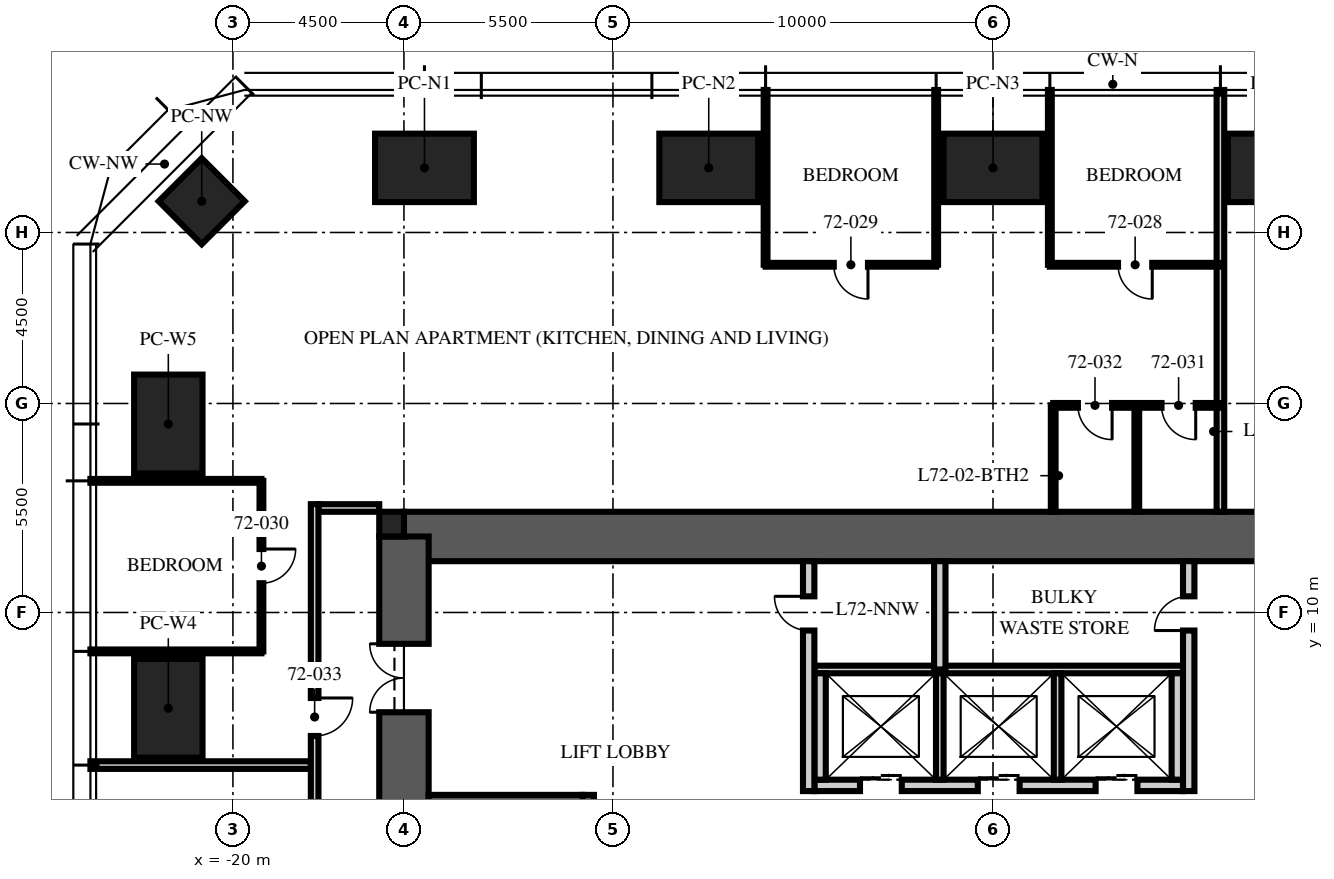
"""IFC4 building model, lengths in metres.
Left out: names, types, materials, properties, quantities, classifications, styles, units other than length and angle.
Written with IfcOpenShell. Run it as: python <this file> out.ifc"""

import sys

from ifc_helpers import new_model, si_unit, direction, frame, frame_2d, origin, origin_2d, place, context, subcontext, project, spatial, rectangle, extrude, element, fill, save


model = new_model("IFC4")
c1 = context("Model", 3, precision=1e-05, world=origin(), true_north=direction((0.0, 1.0)))
c2 = subcontext(c1, "Body", "Model", "MODEL_VIEW")
j1 = project(units=[si_unit("LENGTHUNIT", "METRE"), si_unit("PLANEANGLEUNIT", "RADIAN")], contexts=[c1])
p1 = place(None, origin())
s1 = spatial("IfcSite", under=j1, at=p1, CompositionType="ELEMENT")
p2 = place(p1, origin())
s2 = spatial("IfcBuilding", under=s1, at=p2, CompositionType="ELEMENT")
p3 = place(p2, frame((0.0, 0.0, 289.5)))
s3 = spatial("IfcBuildingStorey", under=s2, at=p3, CompositionType="ELEMENT", Elevation=289.5)
p4 = place(p3, frame((-15.5, 12.0, -0.25), z_axis=(0.0, 0.0, 1.0), x_axis=(1.0, 0.0, 0.0)))
e1 = element("IfcWall", 1, at=p4, inside=s3, PredefinedType="SHEAR", context=c2, shape_type="SweptSolid", body=[
    extrude(rectangle(XDim=31.0, YDim=1.3, at=frame_2d((15.5, 0.0))), origin(), (0.0, 0.0, 1.0), 3.75),
])
p5 = place(p3, frame((-15.5, -12.0, -0.25), z_axis=(0.0, 0.0, 1.0), x_axis=(0.0, 1.0, 0.0)))
e2 = element("IfcWall", 2, at=p5, inside=s3, PredefinedType="SHEAR", context=c2, shape_type="SweptSolid", body=[
    extrude(rectangle(XDim=24.0, YDim=1.3, at=frame_2d((12.0, 0.0))), origin(), (0.0, 0.0, 1.0), 3.75),
])
p6 = place(p5, frame((3.125, 0.0, 0.25)))
e3 = element("IfcOpeningElement", 3, at=p6, cuts=e2, PredefinedType="OPENING", context=c2, shape_type="SweptSolid", body=[
    extrude(rectangle(XDim=1.2, YDim=2.1, at=frame_2d((0.6, 1.05))), frame((0.0, 0.66, 0.0), z_axis=(0.0, -1.0, 0.0), x_axis=(1.0, 0.0, 0.0)), (0.0, 0.0, 1.0), 1.32),
])
p7 = place(p5, frame((19.375, 0.0, 0.25)))
e4 = element("IfcOpeningElement", 4, at=p7, cuts=e2, PredefinedType="OPENING", context=c2, shape_type="SweptSolid", body=[
    extrude(rectangle(XDim=1.8, YDim=2.1, at=frame_2d((0.9, 1.05))), frame((0.0, 0.66, 0.0), z_axis=(0.0, -1.0, 0.0), x_axis=(1.0, 0.0, 0.0)), (0.0, 0.0, 1.0), 1.32),
])
p8 = place(p3, frame((-15.825, 12.325, -0.25), z_axis=(0.0, 0.0, 1.0), x_axis=(1.0, 0.0, 0.0)))
e5 = element("IfcColumn", 5, at=p8, inside=s3, PredefinedType="COLUMN", context=c2, shape_type="SweptSolid", body=[
    extrude(rectangle(XDim=0.65, YDim=0.65, at=origin_2d()), origin(), (0.0, 0.0, 1.0), 3.75),
])
for number, where, z_axis, x_axis in (
    (6, (-14.96, 21.7, 0.0), (0.0, 0.0, 1.0), (1.0, 0.0, 0.0)),
    (7, (-7.48, 21.7, 0.0), (0.0, 0.0, 1.0), (1.0, 0.0, 0.0)),
    (8, (0.0, 21.7, 0.0), (0.0, 0.0, 1.0), (1.0, 0.0, 0.0)),
    (9, (7.48, 21.7, 0.0), (0.0, 0.0, 1.0), (1.0, 0.0, 0.0)),
    (10, (-21.7, 7.48, 0.0), (0.0, 0.0, 1.0), (0.0, 1.0, 0.0)),
    (11, (-21.7, 14.96, 0.0), (0.0, 0.0, 1.0), (0.0, 1.0, 0.0)),
):
    element("IfcColumn", number, at=place(p3, frame(where, z_axis=z_axis, x_axis=x_axis)), inside=s3, PredefinedType="COLUMN", context=c2, shape_type="SweptSolid", body=[
        extrude(rectangle(XDim=2.6, YDim=1.8, at=origin_2d()), origin(), (0.0, 0.0, 1.0), 3.75),
    ])
p9 = place(p3, frame((-20.821, 20.821, 0.0), z_axis=(0.0, 0.0, 1.0), x_axis=(0.707106781187, 0.707106781187, 0.0)))
e12 = element("IfcColumn", 12, at=p9, inside=s3, PredefinedType="COLUMN", context=c2, shape_type="SweptSolid", body=[
    extrude(rectangle(XDim=1.6, YDim=1.6, at=origin_2d()), origin(), (0.0, 0.0, 1.0), 3.75),
])
p10 = place(p3, frame((-10.65, -4.9, 0.0), z_axis=(0.0, 0.0, 1.0), x_axis=(0.0, 1.0, 0.0)))
e13 = element("IfcWall", 13, at=p10, inside=s3, PredefinedType="SOLIDWALL", context=c2, shape_type="SweptSolid", body=[
    extrude(rectangle(XDim=10.1, YDim=0.3, at=frame_2d((5.05, 0.0))), origin(), (0.0, 0.0, 1.0), 3.5),
])
p11 = place(p3, frame((-14.85, 5.05, 0.0), z_axis=(0.0, 0.0, 1.0), x_axis=(1.0, 0.0, 0.0)))
e14 = element("IfcWall", 14, at=p11, inside=s3, PredefinedType="SOLIDWALL", context=c2, shape_type="SweptSolid", body=[
    extrude(rectangle(XDim=4.05, YDim=0.3, at=frame_2d((2.025, 0.0))), origin(), (0.0, 0.0, 1.0), 3.5),
])
p12 = place(p3, frame((-4.7, 5.45, 0.0), z_axis=(0.0, 0.0, 1.0), x_axis=(1.0, 0.0, 0.0)))
e15 = element("IfcWall", 15, at=p12, inside=s3, PredefinedType="PARTITIONING", context=c2, shape_type="SweptSolid", body=[
    extrude(rectangle(XDim=9.7, YDim=0.3, at=frame_2d((4.85, 0.0))), origin(), (0.0, 0.0, 1.0), 3.5),
])
p13 = place(p12, frame((1.2, 0.0, 0.0)))
e16 = element("IfcOpeningElement", 16, at=p13, cuts=e15, PredefinedType="OPENING", context=c2, shape_type="SweptSolid", body=[
    extrude(rectangle(XDim=1.1, YDim=2.1, at=frame_2d((0.55, 1.05))), frame((0.0, 0.16, 0.0), z_axis=(0.0, -1.0, 0.0), x_axis=(1.0, 0.0, 0.0)), (0.0, 0.0, 1.0), 0.32),
])
p14 = place(p12, frame((4.3, 0.0, 0.0)))
e17 = element("IfcOpeningElement", 17, at=p14, cuts=e15, PredefinedType="OPENING", context=c2, shape_type="SweptSolid", body=[
    extrude(rectangle(XDim=1.1, YDim=2.1, at=frame_2d((0.55, 1.05))), frame((0.0, 0.16, 0.0), z_axis=(0.0, -1.0, 0.0), x_axis=(1.0, 0.0, 0.0)), (0.0, 0.0, 1.0), 0.32),
])
p15 = place(p12, frame((7.4, 0.0, 0.0)))
e18 = element("IfcOpeningElement", 18, at=p15, cuts=e15, PredefinedType="OPENING", context=c2, shape_type="SweptSolid", body=[
    extrude(rectangle(XDim=1.1, YDim=2.1, at=frame_2d((0.55, 1.05))), frame((0.0, 0.16, 0.0), z_axis=(0.0, -1.0, 0.0), x_axis=(1.0, 0.0, 0.0)), (0.0, 0.0, 1.0), 0.32),
])
p16 = place(p3, frame((-4.7, 8.5, 0.0), z_axis=(0.0, 0.0, 1.0), x_axis=(1.0, 0.0, 0.0)))
e19 = element("IfcWall", 19, at=p16, inside=s3, PredefinedType="PARTITIONING", context=c2, shape_type="SweptSolid", body=[
    extrude(rectangle(XDim=9.7, YDim=0.2, at=frame_2d((4.85, 0.0))), origin(), (0.0, 0.0, 1.0), 3.5),
])
for number, where, z_axis, x_axis in (
    (20, (-4.55, 5.6, 0.0), (0.0, 0.0, 1.0), (0.0, 1.0, 0.0)),
    (21, (4.85, 5.6, 0.0), (0.0, 0.0, 1.0), (0.0, 1.0, 0.0)),
):
    element("IfcWall", number, at=place(p3, frame(where, z_axis=z_axis, x_axis=x_axis)), inside=s3, PredefinedType="PARTITIONING", context=c2, shape_type="SweptSolid", body=[
        extrude(rectangle(XDim=2.8, YDim=0.3, at=frame_2d((1.4, 0.0))), origin(), (0.0, 0.0, 1.0), 3.5),
    ])
for number, where, z_axis, x_axis in (
    (22, (-1.4, 5.6, 0.0), (0.0, 0.0, 1.0), (0.0, 1.0, 0.0)),
    (23, (1.7, 5.6, 0.0), (0.0, 0.0, 1.0), (0.0, 1.0, 0.0)),
):
    element("IfcWall", number, at=place(p3, frame(where, z_axis=z_axis, x_axis=x_axis)), inside=s3, PredefinedType="PARTITIONING", context=c2, shape_type="SweptSolid", body=[
        extrude(rectangle(XDim=2.8, YDim=0.2, at=frame_2d((1.4, 0.0))), origin(), (0.0, 0.0, 1.0), 3.5),
    ])
p17 = place(p3, frame((-4.85, 5.3, 0.0), z_axis=(0.0, 0.0, 1.0), x_axis=(0.0, 1.0, 0.0)))
e24 = element("IfcWall", 24, at=p17, inside=s3, PredefinedType="PARTITIONING", context=c2, shape_type="SweptSolid", body=[
    extrude(rectangle(XDim=6.05, YDim=0.3, at=frame_2d((3.025, 0.0))), origin(), (0.0, 0.0, 1.0), 3.5),
])
p18 = place(p17, frame((4.225, 0.0, 0.0)))
e25 = element("IfcOpeningElement", 25, at=p18, cuts=e24, PredefinedType="OPENING", context=c2, shape_type="SweptSolid", body=[
    extrude(rectangle(XDim=0.9, YDim=2.1, at=frame_2d((0.45, 1.05))), frame((0.0, 0.16, 0.0), z_axis=(0.0, -1.0, 0.0), x_axis=(1.0, 0.0, 0.0)), (0.0, 0.0, 1.0), 0.32),
])
p19 = place(p3, frame((5.15, 5.3, 0.0), z_axis=(0.0, 0.0, 1.0), x_axis=(0.0, 1.0, 0.0)))
e26 = element("IfcWall", 26, at=p19, inside=s3, PredefinedType="PARTITIONING", context=c2, shape_type="SweptSolid", body=[
    extrude(rectangle(XDim=6.05, YDim=0.3, at=frame_2d((3.025, 0.0))), origin(), (0.0, 0.0, 1.0), 3.5),
])
p20 = place(p19, frame((4.225, 0.0, 0.0)))
e27 = element("IfcOpeningElement", 27, at=p20, cuts=e26, PredefinedType="OPENING", context=c2, shape_type="SweptSolid", body=[
    extrude(rectangle(XDim=0.9, YDim=2.1, at=frame_2d((0.45, 1.05))), frame((0.0, 0.16, 0.0), z_axis=(0.0, -1.0, 0.0), x_axis=(1.0, 0.0, 0.0)), (0.0, 0.0, 1.0), 0.32),
])
p21 = place(p3, frame((-1.4, 8.5, 0.0), z_axis=(0.0, 0.0, 1.0), x_axis=(0.0, 1.0, 0.0)))
e28 = element("IfcWall", 28, at=p21, inside=s3, PredefinedType="PARTITIONING", context=c2, shape_type="SweptSolid", body=[
    extrude(rectangle(XDim=2.85, YDim=0.3, at=frame_2d((1.425, 0.0))), origin(), (0.0, 0.0, 1.0), 3.5),
])
p22 = place(p3, frame((-16.15, 12.75, 0.0), z_axis=(0.0, 0.0, 1.0), x_axis=(-1.0, 0.0, 0.0)))
e29 = element("IfcWall", 29, at=p22, inside=s3, PredefinedType="PARTITIONING", context=c2, shape_type="SweptSolid", body=[
    extrude(rectangle(XDim=1.6, YDim=0.2, at=frame_2d((0.8, 0.0))), origin(), (0.0, 0.0, 1.0), 2.6),
])
p23 = place(p3, frame((5.984, 12.65, 0.0), z_axis=(0.0, 0.0, 1.0), x_axis=(0.0, 1.0, 0.0)))
e30 = element("IfcWall", 30, at=p23, inside=s3, PredefinedType="PARTITIONING", context=c2, shape_type="SweptSolid", body=[
    extrude(rectangle(XDim=11.1, YDim=0.2, at=frame_2d((5.55, 0.0))), origin(), (0.0, 0.0, 1.0), 3.01),
])
for number, where, z_axis, x_axis in (
    (31, (1.496, 19.15, 0.0), (0.0, 0.0, 1.0), (0.0, 1.0, 0.0)),
    (32, (-1.496, 19.15, 0.0), (0.0, 0.0, 1.0), (0.0, 1.0, 0.0)),
    (33, (-5.984, 19.15, 0.0), (0.0, 0.0, 1.0), (0.0, 1.0, 0.0)),
):
    element("IfcWall", number, at=place(p3, frame(where, z_axis=z_axis, x_axis=x_axis)), inside=s3, PredefinedType="PARTITIONING", context=c2, shape_type="SweptSolid", body=[
        extrude(rectangle(XDim=4.6, YDim=0.1, at=frame_2d((2.3, 0.0))), origin(), (0.0, 0.0, 1.0), 3.01),
    ])
for number, where, z_axis, x_axis in (
    (34, (-19.25, 13.464, 0.0), (0.0, 0.0, 1.0), (-1.0, 0.0, 0.0)),
    (35, (-19.25, 8.976, 0.0), (0.0, 0.0, 1.0), (-1.0, 0.0, 0.0)),
):
    element("IfcWall", number, at=place(p3, frame(where, z_axis=z_axis, x_axis=x_axis)), inside=s3, PredefinedType="PARTITIONING", context=c2, shape_type="SweptSolid", body=[
        extrude(rectangle(XDim=4.5, YDim=0.1, at=frame_2d((2.25, 0.0))), origin(), (0.0, 0.0, 1.0), 3.01),
    ])
p24 = place(p3, frame((-17.95, 5.984, 0.0), z_axis=(0.0, 0.0, 1.0), x_axis=(-1.0, 0.0, 0.0)))
e36 = element("IfcWall", 36, at=p24, inside=s3, PredefinedType="PARTITIONING", context=c2, shape_type="SweptSolid", body=[
    extrude(rectangle(XDim=5.8, YDim=0.2, at=frame_2d((2.9, 0.0))), origin(), (0.0, 0.0, 1.0), 3.01),
])
p25 = place(p3, frame((5.984, 19.15, 0.0), z_axis=(0.0, 0.0, 1.0), x_axis=(-1.0, 0.0, 0.0)))
e37 = element("IfcWall", 37, at=p25, inside=s3, PredefinedType="PARTITIONING", context=c2, shape_type="SweptSolid", body=[
    extrude(rectangle(XDim=4.488, YDim=0.1, at=frame_2d((2.244, 0.0))), origin(), (0.0, 0.0, 1.0), 2.91),
])
p26 = place(p25, frame((1.794, 0.0, 0.0)))
e38 = element("IfcOpeningElement", 38, at=p26, cuts=e37, PredefinedType="OPENING", context=c2, shape_type="SweptSolid", body=[
    extrude(rectangle(XDim=0.9, YDim=2.1, at=frame_2d((0.45, 1.05))), frame((0.0, 0.06, 0.0), z_axis=(0.0, -1.0, 0.0), x_axis=(1.0, 0.0, 0.0)), (0.0, 0.0, 1.0), 0.12),
])
p27 = place(p3, frame((-1.496, 19.15, 0.0), z_axis=(0.0, 0.0, 1.0), x_axis=(-1.0, 0.0, 0.0)))
e39 = element("IfcWall", 39, at=p27, inside=s3, PredefinedType="PARTITIONING", context=c2, shape_type="SweptSolid", body=[
    extrude(rectangle(XDim=4.488, YDim=0.1, at=frame_2d((2.244, 0.0))), origin(), (0.0, 0.0, 1.0), 2.91),
])
p28 = place(p27, frame((1.794, 0.0, 0.0)))
e40 = element("IfcOpeningElement", 40, at=p28, cuts=e39, PredefinedType="OPENING", context=c2, shape_type="SweptSolid", body=[
    extrude(rectangle(XDim=0.9, YDim=2.1, at=frame_2d((0.45, 1.05))), frame((0.0, 0.06, 0.0), z_axis=(0.0, -1.0, 0.0), x_axis=(1.0, 0.0, 0.0)), (0.0, 0.0, 1.0), 0.12),
])
p29 = place(p3, frame((-19.25, 13.464, 0.0), z_axis=(0.0, 0.0, 1.0), x_axis=(0.0, -1.0, 0.0)))
e41 = element("IfcWall", 41, at=p29, inside=s3, PredefinedType="PARTITIONING", context=c2, shape_type="SweptSolid", body=[
    extrude(rectangle(XDim=4.488, YDim=0.1, at=frame_2d((2.244, 0.0))), origin(), (0.0, 0.0, 1.0), 2.91),
])
p30 = place(p29, frame((1.794, 0.0, 0.0)))
e42 = element("IfcOpeningElement", 42, at=p30, cuts=e41, PredefinedType="OPENING", context=c2, shape_type="SweptSolid", body=[
    extrude(rectangle(XDim=0.9, YDim=2.1, at=frame_2d((0.45, 1.05))), frame((0.0, 0.06, 0.0), z_axis=(0.0, -1.0, 0.0), x_axis=(1.0, 0.0, 0.0)), (0.0, 0.0, 1.0), 0.12),
])
p31 = place(p3, frame((5.984, 15.45, 0.0), z_axis=(0.0, 0.0, 1.0), x_axis=(-1.0, 0.0, 0.0)))
e43 = element("IfcWall", 43, at=p31, inside=s3, PredefinedType="PARTITIONING", context=c2, shape_type="SweptSolid", body=[
    extrude(rectangle(XDim=4.4, YDim=0.125, at=frame_2d((2.2, 0.0))), origin(), (0.0, 0.0, 1.0), 2.91),
])
p32 = place(p31, frame((0.65, 0.0, 0.0)))
e44 = element("IfcOpeningElement", 44, at=p32, cuts=e43, PredefinedType="OPENING", context=c2, shape_type="SweptSolid", body=[
    extrude(rectangle(XDim=0.9, YDim=2.1, at=frame_2d((0.45, 1.05))), frame((0.0, 0.073, 0.0), z_axis=(0.0, -1.0, 0.0), x_axis=(1.0, 0.0, 0.0)), (0.0, 0.0, 1.0), 0.145),
])
p33 = place(p31, frame((2.85, 0.0, 0.0)))
e45 = element("IfcOpeningElement", 45, at=p33, cuts=e43, PredefinedType="OPENING", context=c2, shape_type="SweptSolid", body=[
    extrude(rectangle(XDim=0.9, YDim=2.1, at=frame_2d((0.45, 1.05))), frame((0.0, 0.073, 0.0), z_axis=(0.0, -1.0, 0.0), x_axis=(1.0, 0.0, 0.0)), (0.0, 0.0, 1.0), 0.145),
])
p34 = place(p3, frame((3.784, 12.65, 0.0), z_axis=(0.0, 0.0, 1.0), x_axis=(0.0, 1.0, 0.0)))
e46 = element("IfcWall", 46, at=p34, inside=s3, PredefinedType="PARTITIONING", context=c2, shape_type="SweptSolid", body=[
    extrude(rectangle(XDim=2.8, YDim=0.125, at=frame_2d((1.4, 0.0))), origin(), (0.0, 0.0, 1.0), 2.91),
])
p35 = place(p3, frame((1.584, 12.65, 0.0), z_axis=(0.0, 0.0, 1.0), x_axis=(0.0, 1.0, 0.0)))
e47 = element("IfcWall", 47, at=p35, inside=s3, PredefinedType="PARTITIONING", context=c2, shape_type="SweptSolid", body=[
    extrude(rectangle(XDim=2.8, YDim=0.125, at=frame_2d((1.4, 0.0))), origin(), (0.0, 0.0, 1.0), 3.5),
])
p36 = place(p3, frame((-17.85, 12.85, 0.0), z_axis=(0.0, 0.0, 1.0), x_axis=(0.0, -1.0, 0.0)))
e48 = element("IfcWall", 48, at=p36, inside=s3, PredefinedType="PARTITIONING", context=c2, shape_type="SweptSolid", body=[
    extrude(rectangle(XDim=25.7, YDim=0.2, at=frame_2d((12.85, 0.0))), origin(), (0.0, 0.0, 1.0), 2.9),
])
p37 = place(p36, frame((5.1, 0.0, 0.0)))
e49 = element("IfcOpeningElement", 49, at=p37, cuts=e48, PredefinedType="OPENING", context=c2, shape_type="SweptSolid", body=[
    extrude(rectangle(XDim=1.0, YDim=2.2, at=frame_2d((0.5, 1.1))), frame((0.0, 0.11, 0.0), z_axis=(0.0, -1.0, 0.0), x_axis=(1.0, 0.0, 0.0)), (0.0, 0.0, 1.0), 0.22),
])
p38 = place(p36, frame((23.386, 0.0, 0.0)))
e50 = element("IfcOpeningElement", 50, at=p38, cuts=e48, PredefinedType="OPENING", context=c2, shape_type="SweptSolid", body=[
    extrude(rectangle(XDim=1.0, YDim=2.2, at=frame_2d((0.5, 1.1))), frame((0.0, 0.11, 0.0), z_axis=(0.0, -1.0, 0.0), x_axis=(1.0, 0.0, 0.0)), (0.0, 0.0, 1.0), 0.22),
])
p39 = place(p7, origin())
e51 = element("IfcDoor", 51, at=p39, inside=s3, OperationType="DOUBLE_DOOR_SINGLE_SWING", PredefinedType="DOOR", context=c2, shape_type="SweptSolid", body=[
    extrude(rectangle(XDim=1.8, YDim=2.1, at=frame_2d((0.9, 1.05))), frame((0.0, 0.025, 0.0), z_axis=(0.0, -1.0, 0.0), x_axis=(1.0, 0.0, 0.0)), (0.0, 0.0, 1.0), 0.05),
])
fill(e4, e51)
p40 = place(p13, origin())
e52 = element("IfcDoor", 52, at=p40, inside=s3, OperationType="DOUBLE_DOOR_SLIDING", PredefinedType="DOOR", context=c2, shape_type="SweptSolid", body=[
    extrude(rectangle(XDim=1.1, YDim=2.1, at=frame_2d((0.55, 1.05))), frame((0.0, 0.025, 0.0), z_axis=(0.0, -1.0, 0.0), x_axis=(1.0, 0.0, 0.0)), (0.0, 0.0, 1.0), 0.05),
])
fill(e16, e52)
p41 = place(p14, origin())
e53 = element("IfcDoor", 53, at=p41, inside=s3, OperationType="DOUBLE_DOOR_SLIDING", PredefinedType="DOOR", context=c2, shape_type="SweptSolid", body=[
    extrude(rectangle(XDim=1.1, YDim=2.1, at=frame_2d((0.55, 1.05))), frame((0.0, 0.025, 0.0), z_axis=(0.0, -1.0, 0.0), x_axis=(1.0, 0.0, 0.0)), (0.0, 0.0, 1.0), 0.05),
])
fill(e17, e53)
p42 = place(p15, origin())
e54 = element("IfcDoor", 54, at=p42, inside=s3, OperationType="DOUBLE_DOOR_SLIDING", PredefinedType="DOOR", context=c2, shape_type="SweptSolid", body=[
    extrude(rectangle(XDim=1.1, YDim=2.1, at=frame_2d((0.55, 1.05))), frame((0.0, 0.025, 0.0), z_axis=(0.0, -1.0, 0.0), x_axis=(1.0, 0.0, 0.0)), (0.0, 0.0, 1.0), 0.05),
])
fill(e18, e54)
p43 = place(p18, origin())
e55 = element("IfcDoor", 55, at=p43, inside=s3, OperationType="SINGLE_SWING_RIGHT", PredefinedType="DOOR", context=c2, shape_type="SweptSolid", body=[
    extrude(rectangle(XDim=0.9, YDim=2.1, at=frame_2d((0.45, 1.05))), frame((0.0, 0.025, 0.0), z_axis=(0.0, -1.0, 0.0), x_axis=(1.0, 0.0, 0.0)), (0.0, 0.0, 1.0), 0.05),
])
fill(e25, e55)
p44 = place(p20, origin())
e56 = element("IfcDoor", 56, at=p44, inside=s3, OperationType="SINGLE_SWING_LEFT", PredefinedType="DOOR", context=c2, shape_type="SweptSolid", body=[
    extrude(rectangle(XDim=0.9, YDim=2.1, at=frame_2d((0.45, 1.05))), frame((0.0, 0.025, 0.0), z_axis=(0.0, -1.0, 0.0), x_axis=(1.0, 0.0, 0.0)), (0.0, 0.0, 1.0), 0.05),
])
fill(e27, e56)
p45 = place(p26, origin())
e57 = element("IfcDoor", 57, at=p45, inside=s3, OperationType="SINGLE_SWING_LEFT", PredefinedType="DOOR", context=c2, shape_type="SweptSolid", body=[
    extrude(rectangle(XDim=0.9, YDim=2.1, at=frame_2d((0.45, 1.05))), frame((0.0, 0.025, 0.0), z_axis=(0.0, -1.0, 0.0), x_axis=(1.0, 0.0, 0.0)), (0.0, 0.0, 1.0), 0.05),
])
fill(e38, e57)
p46 = place(p28, origin())
e58 = element("IfcDoor", 58, at=p46, inside=s3, OperationType="SINGLE_SWING_LEFT", PredefinedType="DOOR", context=c2, shape_type="SweptSolid", body=[
    extrude(rectangle(XDim=0.9, YDim=2.1, at=frame_2d((0.45, 1.05))), frame((0.0, 0.025, 0.0), z_axis=(0.0, -1.0, 0.0), x_axis=(1.0, 0.0, 0.0)), (0.0, 0.0, 1.0), 0.05),
])
fill(e40, e58)
p47 = place(p30, origin())
e59 = element("IfcDoor", 59, at=p47, inside=s3, OperationType="SINGLE_SWING_LEFT", PredefinedType="DOOR", context=c2, shape_type="SweptSolid", body=[
    extrude(rectangle(XDim=0.9, YDim=2.1, at=frame_2d((0.45, 1.05))), frame((0.0, 0.025, 0.0), z_axis=(0.0, -1.0, 0.0), x_axis=(1.0, 0.0, 0.0)), (0.0, 0.0, 1.0), 0.05),
])
fill(e42, e59)
p48 = place(p32, origin())
e60 = element("IfcDoor", 60, at=p48, inside=s3, OperationType="SINGLE_SWING_LEFT", PredefinedType="DOOR", context=c2, shape_type="SweptSolid", body=[
    extrude(rectangle(XDim=0.9, YDim=2.1, at=frame_2d((0.45, 1.05))), frame((0.0, 0.025, 0.0), z_axis=(0.0, -1.0, 0.0), x_axis=(1.0, 0.0, 0.0)), (0.0, 0.0, 1.0), 0.05),
])
fill(e44, e60)
p49 = place(p33, origin())
e61 = element("IfcDoor", 61, at=p49, inside=s3, OperationType="SINGLE_SWING_LEFT", PredefinedType="DOOR", context=c2, shape_type="SweptSolid", body=[
    extrude(rectangle(XDim=0.9, YDim=2.1, at=frame_2d((0.45, 1.05))), frame((0.0, 0.025, 0.0), z_axis=(0.0, -1.0, 0.0), x_axis=(1.0, 0.0, 0.0)), (0.0, 0.0, 1.0), 0.05),
])
fill(e45, e61)
p50 = place(p37, origin())
e62 = element("IfcDoor", 62, at=p50, inside=s3, OperationType="SINGLE_SWING_LEFT", PredefinedType="DOOR", context=c2, shape_type="SweptSolid", body=[
    extrude(rectangle(XDim=1.0, YDim=2.2, at=frame_2d((0.5, 1.1))), frame((0.0, 0.025, 0.0), z_axis=(0.0, -1.0, 0.0), x_axis=(1.0, 0.0, 0.0)), (0.0, 0.0, 1.0), 0.05),
])
fill(e49, e62)
save(model, sys.argv[1])
